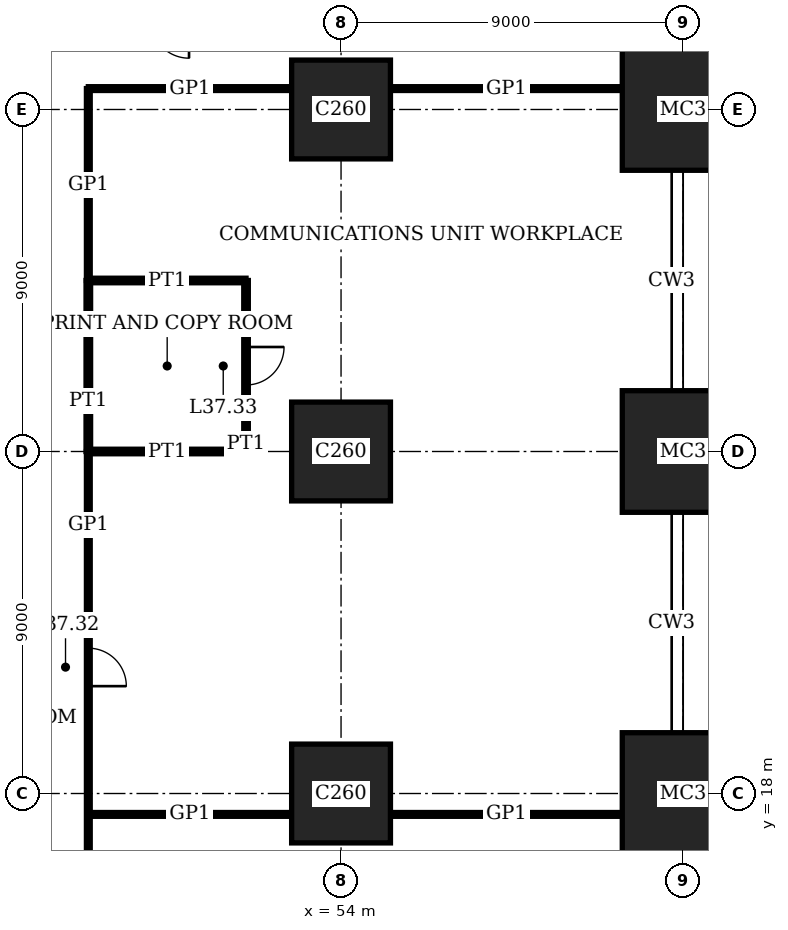
"""IFC4 building model, lengths in metres.
Left out: names, types, materials, properties, quantities, classifications, styles, units other than length and angle.
Written with IfcOpenShell. Run it as: python <this file> out.ifc"""

import sys

from ifc_helpers import new_model, si_unit, direction, frame, frame_2d, origin, origin_2d, place, context, subcontext, project, spatial, rectangle, extrude, element, fill, save


model = new_model("IFC4")
c1 = context("Model", 3, precision=1e-05, world=origin(), true_north=direction((0.0, 1.0)))
c2 = subcontext(c1, "Body", "Model", "MODEL_VIEW")
j1 = project(units=[si_unit("LENGTHUNIT", "METRE"), si_unit("PLANEANGLEUNIT", "RADIAN")], contexts=[c1])
p1 = place(None, origin())
s1 = spatial("IfcSite", under=j1, at=p1, CompositionType="ELEMENT")
p2 = place(p1, origin())
s2 = spatial("IfcBuilding", under=s1, at=p2, CompositionType="ELEMENT")
p3 = place(p2, frame((0.0, 0.0, 153.0)))
s3 = spatial("IfcBuildingStorey", under=s2, at=p3, CompositionType="ELEMENT", Elevation=153.0)
for number, where, z_axis, x_axis in (
    (1, (54.0, 18.0, 0.0), (0.0, 0.0, 1.0), (1.0, 0.0, 0.0)),
    (2, (54.0, 27.0, 0.0), (0.0, 0.0, 1.0), (1.0, 0.0, 0.0)),
    (3, (54.0, 36.0, 0.0), (0.0, 0.0, 1.0), (1.0, 0.0, 0.0)),
):
    element("IfcColumn", number, at=place(p3, frame(where, z_axis=z_axis, x_axis=x_axis)), inside=s3, PredefinedType="COLUMN", context=c2, shape_type="SweptSolid", body=[
        extrude(rectangle(XDim=2.6, YDim=2.6, at=origin_2d()), origin(), (0.0, 0.0, 1.0), 4.2),
    ])
for number, where, z_axis, x_axis in (
    (4, (63.0, 18.0, 0.0), (0.0, 0.0, 1.0), (1.0, 0.0, 0.0)),
    (5, (63.0, 27.0, 0.0), (0.0, 0.0, 1.0), (1.0, 0.0, 0.0)),
    (6, (63.0, 36.0, 0.0), (0.0, 0.0, 1.0), (1.0, 0.0, 0.0)),
):
    element("IfcColumn", number, at=place(p3, frame(where, z_axis=z_axis, x_axis=x_axis)), inside=s3, PredefinedType="COLUMN", context=c2, shape_type="SweptSolid", body=[
        extrude(rectangle(XDim=3.2, YDim=3.2, at=origin_2d()), origin(), (0.0, 0.0, 1.0), 4.2),
    ])
p4 = place(p3, frame((47.35, 17.45, 0.0), z_axis=(0.0, 0.0, 1.0), x_axis=(1.0, 0.0, 0.0)))
e7 = element("IfcWall", 7, at=p4, inside=s3, PredefinedType="PARTITIONING", context=c2, shape_type="SweptSolid", body=[
    extrude(rectangle(XDim=5.35, YDim=0.1, at=frame_2d((2.675, 0.0))), origin(), (0.0, 0.0, 1.0), 3.85),
])
p5 = place(p3, frame((55.3, 17.45, 0.0), z_axis=(0.0, 0.0, 1.0), x_axis=(1.0, 0.0, 0.0)))
e8 = element("IfcWall", 8, at=p5, inside=s3, PredefinedType="PARTITIONING", context=c2, shape_type="SweptSolid", body=[
    extrude(rectangle(XDim=6.1, YDim=0.1, at=frame_2d((3.05, 0.0))), origin(), (0.0, 0.0, 1.0), 3.85),
])
p6 = place(p3, frame((47.35, 27.0, 0.0), z_axis=(0.0, 0.0, 1.0), x_axis=(1.0, 0.0, 0.0)))
e9 = element("IfcWall", 9, at=p6, inside=s3, PredefinedType="PARTITIONING", context=c2, shape_type="SweptSolid", body=[
    extrude(rectangle(XDim=4.15, YDim=0.12, at=frame_2d((2.075, 0.0))), origin(), (0.0, 0.0, 1.0), 3.25),
])
p7 = place(p3, frame((47.35, 31.5, 0.0), z_axis=(0.0, 0.0, 1.0), x_axis=(1.0, 0.0, 0.0)))
e10 = element("IfcWall", 10, at=p7, inside=s3, PredefinedType="PARTITIONING", context=c2, shape_type="SweptSolid", body=[
    extrude(rectangle(XDim=4.15, YDim=0.12, at=frame_2d((2.075, 0.0))), origin(), (0.0, 0.0, 1.0), 3.15),
])
p8 = place(p3, frame((47.35, 36.55, 0.0), z_axis=(0.0, 0.0, 1.0), x_axis=(1.0, 0.0, 0.0)))
e11 = element("IfcWall", 11, at=p8, inside=s3, PredefinedType="PARTITIONING", context=c2, shape_type="SweptSolid", body=[
    extrude(rectangle(XDim=5.35, YDim=0.1, at=frame_2d((2.675, 0.0))), origin(), (0.0, 0.0, 1.0), 3.85),
])
p9 = place(p3, frame((55.3, 36.55, 0.0), z_axis=(0.0, 0.0, 1.0), x_axis=(1.0, 0.0, 0.0)))
e12 = element("IfcWall", 12, at=p9, inside=s3, PredefinedType="PARTITIONING", context=c2, shape_type="SweptSolid", body=[
    extrude(rectangle(XDim=6.1, YDim=0.1, at=frame_2d((3.05, 0.0))), origin(), (0.0, 0.0, 1.0), 3.85),
])
p10 = place(p3, frame((47.35, 27.0, 0.0), z_axis=(0.0, 0.0, 1.0), x_axis=(0.0, 1.0, 0.0)))
e13 = element("IfcWall", 13, at=p10, inside=s3, PredefinedType="PARTITIONING", context=c2, shape_type="SweptSolid", body=[
    extrude(rectangle(XDim=4.5, YDim=0.12, at=frame_2d((2.25, 0.0))), origin(), (0.0, 0.0, 1.0), 3.85),
])
p11 = place(p3, frame((47.35, 15.65, 0.0), z_axis=(0.0, 0.0, 1.0), x_axis=(0.0, 1.0, 0.0)))
e14 = element("IfcWall", 14, at=p11, inside=s3, PredefinedType="PARTITIONING", context=c2, shape_type="SweptSolid", body=[
    extrude(rectangle(XDim=11.35, YDim=0.1, at=frame_2d((5.675, 0.0))), origin(), (0.0, 0.0, 1.0), 3.85),
])
p12 = place(p11, frame((5.175, 0.0, 0.0)))
e15 = element("IfcOpeningElement", 15, at=p12, cuts=e14, PredefinedType="OPENING", context=c2, shape_type="SweptSolid", body=[
    extrude(rectangle(XDim=1.0, YDim=2.4, at=frame_2d((0.5, 1.2))), frame((0.0, 0.06, 0.0), z_axis=(0.0, -1.0, 0.0), x_axis=(1.0, 0.0, 0.0)), (0.0, 0.0, 1.0), 0.12),
])
p13 = place(p3, frame((47.35, 31.5, 0.0), z_axis=(0.0, 0.0, 1.0), x_axis=(0.0, 1.0, 0.0)))
e16 = element("IfcWall", 16, at=p13, inside=s3, PredefinedType="PARTITIONING", context=c2, shape_type="SweptSolid", body=[
    extrude(rectangle(XDim=5.05, YDim=0.1, at=frame_2d((2.525, 0.0))), origin(), (0.0, 0.0, 1.0), 3.85),
])
p14 = place(p3, frame((51.5, 27.0, 0.0), z_axis=(0.0, 0.0, 1.0), x_axis=(0.0, 1.0, 0.0)))
e17 = element("IfcWall", 17, at=p14, inside=s3, PredefinedType="PARTITIONING", context=c2, shape_type="SweptSolid", body=[
    extrude(rectangle(XDim=4.5, YDim=0.12, at=frame_2d((2.25, 0.0))), origin(), (0.0, 0.0, 1.0), 3.85),
])
p15 = place(p14, frame((1.75, 0.0, 0.0)))
e18 = element("IfcOpeningElement", 18, at=p15, cuts=e17, PredefinedType="OPENING", context=c2, shape_type="SweptSolid", body=[
    extrude(rectangle(XDim=1.0, YDim=2.4, at=frame_2d((0.5, 1.2))), frame((0.0, 0.07, 0.0), z_axis=(0.0, -1.0, 0.0), x_axis=(1.0, 0.0, 0.0)), (0.0, 0.0, 1.0), 0.14),
])
p16 = place(p12, origin())
e19 = element("IfcDoor", 19, at=p16, inside=s3, OperationType="SINGLE_SWING_LEFT", PredefinedType="DOOR", context=c2, shape_type="SweptSolid", body=[
    extrude(rectangle(XDim=1.0, YDim=2.4, at=frame_2d((0.5, 1.2))), frame((0.0, 0.02, 0.0), z_axis=(0.0, -1.0, 0.0), x_axis=(1.0, 0.0, 0.0)), (0.0, 0.0, 1.0), 0.04),
])
fill(e15, e19)
p17 = place(p15, origin())
e20 = element("IfcDoor", 20, at=p17, inside=s3, OperationType="SINGLE_SWING_RIGHT", PredefinedType="DOOR", context=c2, shape_type="SweptSolid", body=[
    extrude(rectangle(XDim=1.0, YDim=2.4, at=frame_2d((0.5, 1.2))), frame((0.0, 0.025, 0.0), z_axis=(0.0, -1.0, 0.0), x_axis=(1.0, 0.0, 0.0)), (0.0, 0.0, 1.0), 0.05),
])
fill(e18, e20)
save(model, sys.argv[1])
